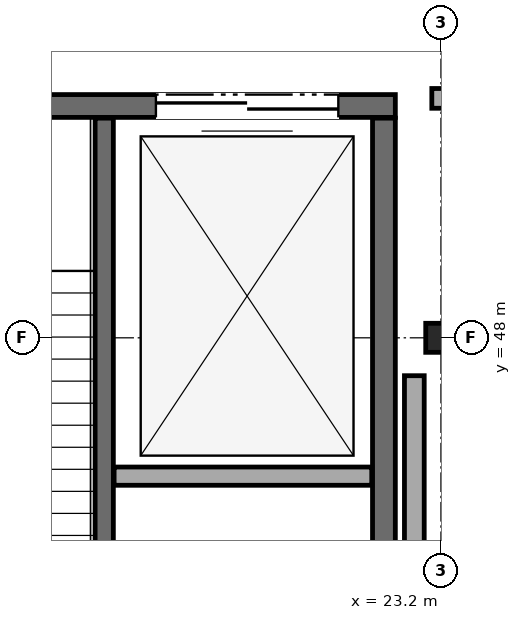
"""IFC4 building model, lengths in metres.
Left out: names, types, materials, properties, quantities, classifications, styles, units other than length and angle.
Written with IfcOpenShell. Run it as: python <this file> out.ifc"""

import sys

from ifc_helpers import new_model, si_unit, direction, frame, frame_2d, origin, origin_2d, place, context, subcontext, project, spatial, rectangle, i_section, extrude, element, fill, save


model = new_model("IFC4")
c1 = context("Model", 3, precision=1e-05, world=origin(), true_north=direction((0.0, 1.0)))
c2 = subcontext(c1, "Body", "Model", "MODEL_VIEW")
j1 = project(units=[si_unit("LENGTHUNIT", "METRE"), si_unit("PLANEANGLEUNIT", "RADIAN")], contexts=[c1])
p1 = place(None, origin())
s1 = spatial("IfcSite", under=j1, at=p1, CompositionType="ELEMENT")
p2 = place(p1, origin())
s2 = spatial("IfcBuilding", under=s1, at=p2, CompositionType="ELEMENT")
p3 = place(p2, frame((0.0, 0.0, -5.4)))
s3 = spatial("IfcBuildingStorey", under=s2, at=p3, CompositionType="ELEMENT", Elevation=-5.4)
p4 = place(p3, frame((23.2, 48.0, 0.0), z_axis=(0.0, 0.0, 1.0), x_axis=(1.0, 0.0, 0.0)))
e1 = element("IfcColumn", 1, at=p4, inside=s3, PredefinedType="COLUMN", context=c2, shape_type="SweptSolid", body=[
    extrude(i_section(OverallWidth=0.4, OverallDepth=0.382, WebThickness=0.025, FlangeThickness=0.036, at=origin_2d()), origin(), (0.0, 0.0, 1.0), 5.4),
])
p5 = place(p3, frame((22.6, 51.05, 0.0), z_axis=(0.0, 0.0, 1.0), x_axis=(-1.0, 0.0, 0.0)))
e2 = element("IfcWall", 2, at=p5, inside=s3, PredefinedType="SHEAR", context=c2, shape_type="SweptSolid", body=[
    extrude(rectangle(XDim=8.4, YDim=0.3, at=frame_2d((4.2, 0.0))), origin(), (0.0, 0.0, 1.0), 5.095),
])
p6 = place(p5, frame((5.435, 0.0, 0.0)))
e3 = element("IfcOpeningElement", 3, at=p6, cuts=e2, PredefinedType="OPENING", context=c2, shape_type="SweptSolid", body=[
    extrude(rectangle(XDim=1.25, YDim=2.2, at=frame_2d((0.625, 1.1))), frame((0.0, 0.16, 0.0), z_axis=(0.0, -1.0, 0.0), x_axis=(1.0, 0.0, 0.0)), (0.0, 0.0, 1.0), 0.32),
])
p7 = place(p5, frame((0.75, 0.0, 0.0)))
e4 = element("IfcOpeningElement", 4, at=p7, cuts=e2, PredefinedType="OPENING", context=c2, shape_type="SweptSolid", body=[
    extrude(rectangle(XDim=2.4, YDim=2.55, at=frame_2d((1.2, 1.275))), frame((0.0, 0.16, 0.0), z_axis=(0.0, -1.0, 0.0), x_axis=(1.0, 0.0, 0.0)), (0.0, 0.0, 1.0), 0.32),
])
p8 = place(p3, frame((22.45, 41.51, 0.0), z_axis=(0.0, 0.0, 1.0), x_axis=(0.0, 1.0, 0.0)))
e5 = element("IfcWall", 5, at=p8, inside=s3, PredefinedType="SHEAR", context=c2, shape_type="SweptSolid", body=[
    extrude(rectangle(XDim=9.38, YDim=0.3, at=frame_2d((4.69, 0.0))), origin(), (0.0, 0.0, 1.0), 5.095),
])
p9 = place(p3, frame((18.77, 41.51, 0.0), z_axis=(0.0, 0.0, 1.0), x_axis=(0.0, 1.0, 0.0)))
e6 = element("IfcWall", 6, at=p9, inside=s3, PredefinedType="SOLIDWALL", context=c2, shape_type="SweptSolid", body=[
    extrude(rectangle(XDim=9.38, YDim=0.24, at=frame_2d((4.69, 0.0))), origin(), (0.0, 0.0, 1.0), 5.095),
])
p10 = place(p3, frame((18.9, 46.18, 0.0), z_axis=(0.0, 0.0, 1.0), x_axis=(1.0, 0.0, 0.0)))
e7 = element("IfcWall", 7, at=p10, inside=s3, PredefinedType="SOLIDWALL", context=c2, shape_type="SweptSolid", body=[
    extrude(rectangle(XDim=3.39, YDim=0.24, at=frame_2d((1.695, 0.0))), origin(), (0.0, 0.0, 1.0), 5.095),
])
p11 = place(p3, frame((22.85, 39.698, 0.0), z_axis=(0.0, 0.0, 1.0), x_axis=(0.0, 1.0, 0.0)))
e8 = element("IfcWall", 8, at=p11, inside=s3, PredefinedType="SOLIDWALL", context=c2, shape_type="SweptSolid", body=[
    extrude(rectangle(XDim=7.803, YDim=0.26, at=frame_2d((3.901, 0.0))), origin(), (0.0, 0.0, 1.0), 5.03),
])
p12 = place(p11, frame((0.296, 0.0, 0.0)))
e9 = element("IfcOpeningElement", 9, at=p12, cuts=e8, PredefinedType="OPENING", context=c2, shape_type="SweptSolid", body=[
    extrude(rectangle(XDim=0.9, YDim=2.08, at=frame_2d((0.45, 1.04))), frame((0.0, 0.14, 0.0), z_axis=(0.0, -1.0, 0.0), x_axis=(1.0, 0.0, 0.0)), (0.0, 0.0, 1.0), 0.28),
])
p13 = place(p3, frame((23.08, 51.15, 0.0), z_axis=(0.0, 0.0, 1.0), x_axis=(1.0, 0.0, 0.0)))
e10 = element("IfcWall", 10, at=p13, inside=s3, PredefinedType="SOLIDWALL", context=c2, shape_type="SweptSolid", body=[
    extrude(rectangle(XDim=3.04, YDim=0.26, at=frame_2d((1.52, 0.0))), origin(), (0.0, 0.0, 1.0), 4.537),
])
p14 = place(p7, origin())
e11 = element("IfcDoor", 11, at=p14, inside=s3, OperationType="DOUBLE_DOOR_SLIDING", PredefinedType="DOOR", context=c2, shape_type="SweptSolid", body=[
    extrude(rectangle(XDim=2.4, YDim=2.55, at=frame_2d((1.2, 1.275))), frame((0.0, 0.025, 0.0), z_axis=(0.0, -1.0, 0.0), x_axis=(1.0, 0.0, 0.0)), (0.0, 0.0, 1.0), 0.05),
])
fill(e4, e11)
save(model, sys.argv[1])
